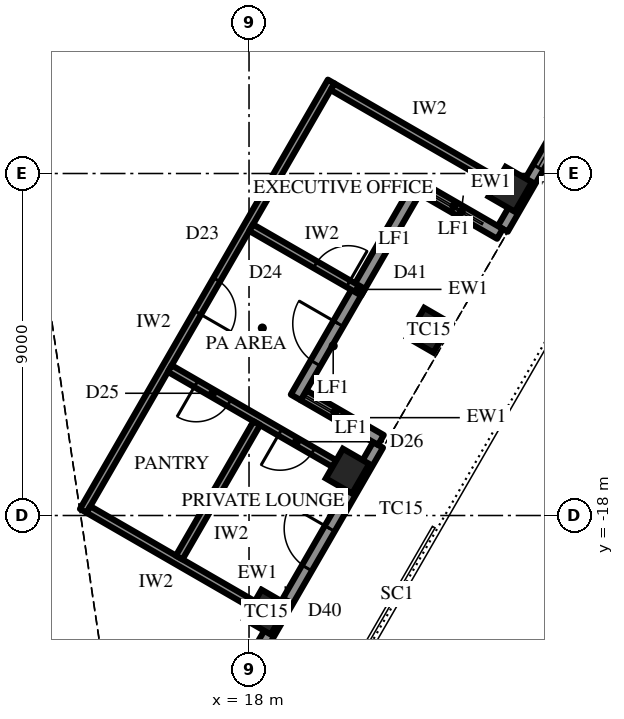
"""IFC4 building model, lengths in metres.
Left out: names, types, materials, properties, quantities, classifications, styles, units other than length and angle.
Written with IfcOpenShell. Run it as: python <this file> out.ifc"""

import sys

from ifc_helpers import new_model, si_unit, direction, frame, frame_2d, origin, origin_2d, place, context, subcontext, project, spatial, rectangle, extrude, element, fill, save


model = new_model("IFC4")
c1 = context("Model", 3, precision=1e-05, world=origin(), true_north=direction((0.0, 1.0)))
c2 = subcontext(c1, "Body", "Model", "MODEL_VIEW")
j1 = project(units=[si_unit("LENGTHUNIT", "METRE"), si_unit("PLANEANGLEUNIT", "RADIAN")], contexts=[c1])
p1 = place(None, origin())
s1 = spatial("IfcSite", under=j1, at=p1, CompositionType="ELEMENT")
p2 = place(p1, origin())
s2 = spatial("IfcBuilding", under=s1, at=p2, CompositionType="ELEMENT")
p3 = place(p2, frame((0.0, 0.0, 361.9)))
s3 = spatial("IfcBuildingStorey", under=s2, at=p3, CompositionType="ELEMENT", Elevation=361.9)
for number, where, z_axis, x_axis in (
    (1, (18.451, -20.542, 0.0), (0.0, 0.0, 1.0), (0.5, 0.866, 0.0)),
    (2, (20.592, -16.833, 0.0), (0.0, 0.0, 1.0), (0.5, 0.866, 0.0)),
    (3, (22.733, -13.125, 0.0), (0.0, 0.0, 1.0), (0.5, 0.866, 0.0)),
    (4, (24.874, -9.417, 0.0), (0.0, 0.0, 1.0), (0.5, 0.866, 0.0)),
):
    element("IfcColumn", number, at=place(p3, frame(where, z_axis=z_axis, x_axis=x_axis)), inside=s3, PredefinedType="COLUMN", context=c2, shape_type="SweptSolid", body=[
        extrude(rectangle(XDim=0.9, YDim=0.8, at=origin_2d()), origin(), (0.0, 0.0, 1.0), 4.2),
    ])
p4 = place(p3, frame((16.613, -24.425, 0.0), z_axis=(0.0, 0.0, 1.0), x_axis=(0.499996453679, 0.866027451244, 0.0)))
e5 = element("IfcWall", 5, at=p4, inside=s3, PredefinedType="SOLIDWALL", context=c2, shape_type="SweptSolid", body=[
    extrude(rectangle(XDim=9.564, YDim=0.3, at=frame_2d((4.782, 0.0))), origin(), (0.0, 0.0, 1.0), 2.9),
])
p5 = place(p4, frame((0.866, 0.0, 0.6)))
e6 = element("IfcOpeningElement", 6, at=p5, cuts=e5, PredefinedType="OPENING", context=c2, shape_type="SweptSolid", body=[
    extrude(rectangle(XDim=2.55, YDim=2.05, at=frame_2d((1.275, 1.025))), frame((0.0, 0.16, 0.0), z_axis=(0.0, -1.0, 0.0), x_axis=(1.0, 0.0, 0.0)), (0.0, 0.0, 1.0), 0.32),
])
p6 = place(p4, frame((5.823, 0.0, 0.0)))
e7 = element("IfcOpeningElement", 7, at=p6, cuts=e5, PredefinedType="OPENING", context=c2, shape_type="SweptSolid", body=[
    extrude(rectangle(XDim=1.2, YDim=2.4, at=frame_2d((0.6, 1.2))), frame((0.0, 0.16, 0.0), z_axis=(0.0, -1.0, 0.0), x_axis=(1.0, 0.0, 0.0)), (0.0, 0.0, 1.0), 0.32),
])
p7 = place(p3, frame((24.677, -10.458, 0.0), z_axis=(0.0, 0.0, 1.0), x_axis=(0.499996453679, 0.866027451244, 0.0)))
e8 = element("IfcWall", 8, at=p7, inside=s3, PredefinedType="SOLIDWALL", context=c2, shape_type="SweptSolid", body=[
    extrude(rectangle(XDim=9.564, YDim=0.3, at=frame_2d((4.782, 0.0))), origin(), (0.0, 0.0, 1.0), 2.9),
])
p8 = place(p7, frame((1.866, 0.0, 0.6)))
e9 = element("IfcOpeningElement", 9, at=p8, cuts=e8, PredefinedType="OPENING", context=c2, shape_type="SweptSolid", body=[
    extrude(rectangle(XDim=2.55, YDim=2.05, at=frame_2d((1.275, 1.025))), frame((0.0, 0.16, 0.0), z_axis=(0.0, -1.0, 0.0), x_axis=(1.0, 0.0, 0.0)), (0.0, 0.0, 1.0), 0.32),
])
p9 = place(p7, frame((6.148, 0.0, 0.6)))
e10 = element("IfcOpeningElement", 10, at=p9, cuts=e8, PredefinedType="OPENING", context=c2, shape_type="SweptSolid", body=[
    extrude(rectangle(XDim=2.55, YDim=2.05, at=frame_2d((1.275, 1.025))), frame((0.0, 0.16, 0.0), z_axis=(0.0, -1.0, 0.0), x_axis=(1.0, 0.0, 0.0)), (0.0, 0.0, 1.0), 0.32),
])
for number, where, z_axis, x_axis in (
    (11, (21.47, -16.012, 0.0), (0.0, 0.0, 1.0), (-0.866, 0.5, 0.0)),
    (12, (24.602, -10.588, 0.0), (0.0, 0.0, 1.0), (-0.866, 0.5, 0.0)),
):
    element("IfcWall", number, at=place(p3, frame(where, z_axis=z_axis, x_axis=x_axis)), inside=s3, PredefinedType="SOLIDWALL", context=c2, shape_type="SweptSolid", body=[
        extrude(rectangle(XDim=2.35, YDim=0.3, at=frame_2d((1.175, 0.0))), origin(), (0.0, 0.0, 1.0), 2.9),
    ])
p10 = place(p3, frame((19.23, -14.892, 0.0), z_axis=(0.0, 0.0, 1.0), x_axis=(0.499999339774, 0.866025784966, 0.0)))
e13 = element("IfcWall", 13, at=p10, inside=s3, PredefinedType="SOLIDWALL", context=c2, shape_type="SweptSolid", body=[
    extrude(rectangle(XDim=6.564, YDim=0.3, at=frame_2d((3.282, 0.0))), origin(), (0.0, 0.0, 1.0), 2.9),
])
p11 = place(p10, frame((1.041, 0.0, 0.0)))
e14 = element("IfcOpeningElement", 14, at=p11, cuts=e13, PredefinedType="OPENING", context=c2, shape_type="SweptSolid", body=[
    extrude(rectangle(XDim=1.2, YDim=2.4, at=frame_2d((0.6, 1.2))), frame((0.0, 0.16, 0.0), z_axis=(0.0, -1.0, 0.0), x_axis=(1.0, 0.0, 0.0)), (0.0, 0.0, 1.0), 0.32),
])
p12 = place(p3, frame((13.638, -17.878, 0.0), z_axis=(0.0, 0.0, 1.0), x_axis=(0.500013496215, 0.866017611601, 0.0)))
e15 = element("IfcWall", 15, at=p12, inside=s3, PredefinedType="PARTITIONING", context=c2, shape_type="SweptSolid", body=[
    extrude(rectangle(XDim=13.046, YDim=0.2, at=frame_2d((6.523, 0.0))), origin(), (0.0, 0.0, 1.0), 4.0),
])
p13 = place(p12, frame((6.023, 0.0, 0.0)))
e16 = element("IfcOpeningElement", 16, at=p13, cuts=e15, PredefinedType="OPENING", context=c2, shape_type="SweptSolid", body=[
    extrude(rectangle(XDim=1.0, YDim=2.2, at=frame_2d((0.5, 1.1))), frame((0.0, 0.11, 0.0), z_axis=(0.0, -1.0, 0.0), x_axis=(1.0, 0.0, 0.0)), (0.0, 0.0, 1.0), 0.22),
])
p14 = place(p3, frame((13.775, -17.842, 0.0), z_axis=(0.0, 0.0, 1.0), x_axis=(0.866022959057, -0.500004234368, 0.0)))
e17 = element("IfcWall", 17, at=p14, inside=s3, PredefinedType="PARTITIONING", context=c2, shape_type="SweptSolid", body=[
    extrude(rectangle(XDim=5.0, YDim=0.2, at=frame_2d((2.5, 0.0))), origin(), (0.0, 0.0, 1.0), 3.082),
])
p15 = place(p3, frame((15.916, -14.133, 0.0), z_axis=(0.0, 0.0, 1.0), x_axis=(0.866035165624, -0.499983091616, 0.0)))
e18 = element("IfcWall", 18, at=p15, inside=s3, PredefinedType="PARTITIONING", context=c2, shape_type="SweptSolid", body=[
    extrude(rectangle(XDim=5.0, YDim=0.2, at=frame_2d((2.5, 0.0))), origin(), (0.0, 0.0, 1.0), 3.082),
])
p16 = place(p15, frame((0.8, 0.0, 0.0)))
e19 = element("IfcOpeningElement", 19, at=p16, cuts=e18, PredefinedType="OPENING", context=c2, shape_type="SweptSolid", body=[
    extrude(rectangle(XDim=1.0, YDim=2.2, at=frame_2d((0.5, 1.1))), frame((0.0, 0.11, 0.0), z_axis=(0.0, -1.0, 0.0), x_axis=(1.0, 0.0, 0.0)), (0.0, 0.0, 1.0), 0.22),
])
p17 = place(p15, frame((3.35, 0.0, 0.0)))
e20 = element("IfcOpeningElement", 20, at=p17, cuts=e18, PredefinedType="OPENING", context=c2, shape_type="SweptSolid", body=[
    extrude(rectangle(XDim=1.0, YDim=2.2, at=frame_2d((0.5, 1.1))), frame((0.0, 0.11, 0.0), z_axis=(0.0, -1.0, 0.0), x_axis=(1.0, 0.0, 0.0)), (0.0, 0.0, 1.0), 0.22),
])
p18 = place(p3, frame((18.057, -10.425, 0.0), z_axis=(0.0, 0.0, 1.0), x_axis=(0.866030179784, -0.499991727635, 0.0)))
e21 = element("IfcWall", 21, at=p18, inside=s3, PredefinedType="PARTITIONING", context=c2, shape_type="SweptSolid", body=[
    extrude(rectangle(XDim=3.401, YDim=0.2, at=frame_2d((1.7, 0.0))), origin(), (0.0, 0.0, 1.0), 3.082),
])
p19 = place(p18, frame((1.95, 0.0, 0.0)))
e22 = element("IfcOpeningElement", 22, at=p19, cuts=e21, PredefinedType="OPENING", context=c2, shape_type="SweptSolid", body=[
    extrude(rectangle(XDim=1.0, YDim=2.2, at=frame_2d((0.5, 1.1))), frame((0.0, 0.11, 0.0), z_axis=(0.0, -1.0, 0.0), x_axis=(1.0, 0.0, 0.0)), (0.0, 0.0, 1.0), 0.22),
])
p20 = place(p3, frame((20.198, -6.717, 0.0), z_axis=(0.0, 0.0, 1.0), x_axis=(0.866022959057, -0.500004234368, 0.0)))
e23 = element("IfcWall", 23, at=p20, inside=s3, PredefinedType="PARTITIONING", context=c2, shape_type="SweptSolid", body=[
    extrude(rectangle(XDim=5.0, YDim=0.2, at=frame_2d((2.5, 0.0))), origin(), (0.0, 0.0, 1.0), 2.992),
])
p21 = place(p3, frame((16.163, -19.105, 0.0), z_axis=(0.0, 0.0, 1.0), x_axis=(0.499998569178, 0.866026229868, 0.0)))
e24 = element("IfcWall", 24, at=p21, inside=s3, PredefinedType="PARTITIONING", context=c2, shape_type="SweptSolid", body=[
    extrude(rectangle(XDim=4.082, YDim=0.2, at=frame_2d((2.041, 0.0))), origin(), (0.0, 0.0, 1.0), 4.0),
])
p22 = place(p6, origin())
e25 = element("IfcDoor", 25, at=p22, inside=s3, OperationType="SINGLE_SWING_LEFT", PredefinedType="DOOR", context=c2, shape_type="SweptSolid", body=[
    extrude(rectangle(XDim=1.2, YDim=2.4, at=frame_2d((0.6, 1.2))), frame((0.0, 0.025, 0.0), z_axis=(0.0, -1.0, 0.0), x_axis=(1.0, 0.0, 0.0)), (0.0, 0.0, 1.0), 0.05),
])
fill(e7, e25)
p23 = place(p8, origin())
e26 = element("IfcWindow", 26, at=p23, inside=s3, PartitioningType="SINGLE_PANEL", PredefinedType="WINDOW", context=c2, shape_type="SweptSolid", body=[
    extrude(rectangle(XDim=2.55, YDim=2.05, at=frame_2d((1.275, 1.025))), frame((0.0, 0.03, 0.0), z_axis=(0.0, -1.0, 0.0), x_axis=(1.0, 0.0, 0.0)), (0.0, 0.0, 1.0), 0.06),
])
fill(e9, e26)
p24 = place(p11, origin())
e27 = element("IfcDoor", 27, at=p24, inside=s3, OperationType="SINGLE_SWING_LEFT", PredefinedType="DOOR", context=c2, shape_type="SweptSolid", body=[
    extrude(rectangle(XDim=1.2, YDim=2.4, at=frame_2d((0.6, 1.2))), frame((0.0, 0.025, 0.0), z_axis=(0.0, -1.0, 0.0), x_axis=(1.0, 0.0, 0.0)), (0.0, 0.0, 1.0), 0.05),
])
fill(e14, e27)
p25 = place(p16, frame((1.0, 0.0, 0.0), z_axis=(0.0, 0.0, 1.0), x_axis=(-1.0, 0.0, 0.0)))
e28 = element("IfcDoor", 28, at=p25, inside=s3, OperationType="SINGLE_SWING_LEFT", PredefinedType="DOOR", context=c2, shape_type="SweptSolid", body=[
    extrude(rectangle(XDim=1.0, YDim=2.2, at=frame_2d((0.5, 1.1))), frame((0.0, 0.025, 0.0), z_axis=(0.0, -1.0, 0.0), x_axis=(1.0, 0.0, 0.0)), (0.0, 0.0, 1.0), 0.05),
])
fill(e19, e28)
p26 = place(p17, frame((1.0, 0.0, 0.0), z_axis=(0.0, 0.0, 1.0), x_axis=(-1.0, 0.0, 0.0)))
e29 = element("IfcDoor", 29, at=p26, inside=s3, OperationType="SINGLE_SWING_LEFT", PredefinedType="DOOR", context=c2, shape_type="SweptSolid", body=[
    extrude(rectangle(XDim=1.0, YDim=2.2, at=frame_2d((0.5, 1.1))), frame((0.0, 0.025, 0.0), z_axis=(0.0, -1.0, 0.0), x_axis=(1.0, 0.0, 0.0)), (0.0, 0.0, 1.0), 0.05),
])
fill(e20, e29)
p27 = place(p13, frame((1.0, 0.0, 0.0), z_axis=(0.0, 0.0, 1.0), x_axis=(-1.0, 0.0, 0.0)))
e30 = element("IfcDoor", 30, at=p27, inside=s3, OperationType="SINGLE_SWING_LEFT", PredefinedType="DOOR", context=c2, shape_type="SweptSolid", body=[
    extrude(rectangle(XDim=1.0, YDim=2.2, at=frame_2d((0.5, 1.1))), frame((0.0, 0.025, 0.0), z_axis=(0.0, -1.0, 0.0), x_axis=(1.0, 0.0, 0.0)), (0.0, 0.0, 1.0), 0.05),
])
fill(e16, e30)
p28 = place(p19, origin())
e31 = element("IfcDoor", 31, at=p28, inside=s3, OperationType="SINGLE_SWING_LEFT", PredefinedType="DOOR", context=c2, shape_type="SweptSolid", body=[
    extrude(rectangle(XDim=1.0, YDim=2.2, at=frame_2d((0.5, 1.1))), frame((0.0, 0.025, 0.0), z_axis=(0.0, -1.0, 0.0), x_axis=(1.0, 0.0, 0.0)), (0.0, 0.0, 1.0), 0.05),
])
fill(e22, e31)
save(model, sys.argv[1])
